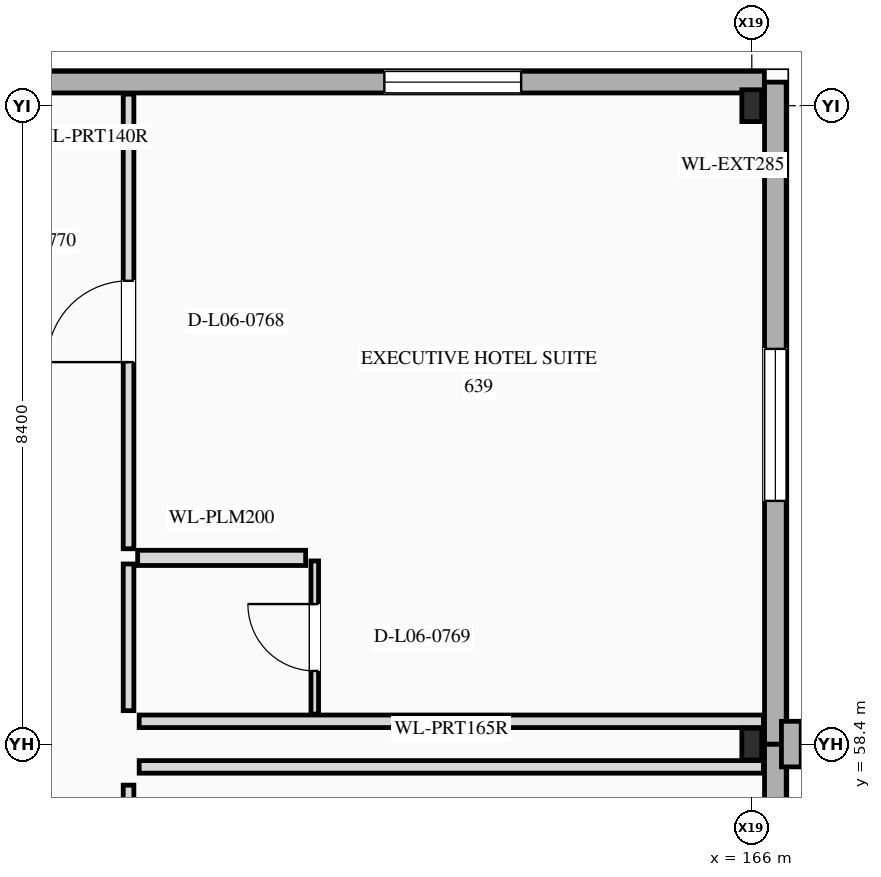
"""IFC4 building model, lengths in metres.
Left out: names, types, materials, properties, quantities, classifications, styles, units other than length and angle.
Written with IfcOpenShell. Run it as: python <this file> out.ifc"""

import sys

from ifc_helpers import new_model, si_unit, direction, frame, frame_2d, origin, origin_2d, place, context, subcontext, project, spatial, rectangle, i_section, extrude, element, fill, save


model = new_model("IFC4")
c1 = context("Model", 3, precision=1e-05, world=origin(), true_north=direction((0.0, 1.0)))
c2 = subcontext(c1, "Body", "Model", "MODEL_VIEW")
j1 = project(units=[si_unit("LENGTHUNIT", "METRE"), si_unit("PLANEANGLEUNIT", "RADIAN")], contexts=[c1])
p1 = place(None, origin())
s1 = spatial("IfcSite", under=j1, at=p1, CompositionType="ELEMENT")
p2 = place(p1, origin())
s2 = spatial("IfcBuilding", under=s1, at=p2, CompositionType="ELEMENT")
p3 = place(p2, frame((0.0, 0.0, 27.0)))
s3 = spatial("IfcBuildingStorey", under=s2, at=p3, CompositionType="ELEMENT", Elevation=27.0)
for number, where, z_axis, x_axis in (
    (1, (166.0, 58.4, 0.0), (0.0, 0.0, 1.0), (1.0, 0.0, 0.0)),
    (2, (166.0, 66.8, 0.0), (0.0, 0.0, 1.0), (1.0, 0.0, 0.0)),
):
    element("IfcColumn", number, at=place(p3, frame(where, z_axis=z_axis, x_axis=x_axis)), inside=s3, PredefinedType="COLUMN", context=c2, shape_type="SweptSolid", body=[
        extrude(i_section(OverallWidth=0.262, OverallDepth=0.419, WebThickness=0.012, FlangeThickness=0.019, at=origin_2d()), origin(), (0.0, 0.0, 1.0), 3.6),
    ])
p4 = place(p3, frame((166.31, 50.0, 0.0), z_axis=(0.0, 0.0, 1.0), x_axis=(0.0, 1.0, 0.0)))
e3 = element("IfcWall", 3, at=p4, inside=s3, PredefinedType="STANDARD", context=c2, shape_type="SweptSolid", body=[
    extrude(rectangle(XDim=8.4, YDim=0.285, at=frame_2d((4.2, 0.0))), origin(), (0.0, 0.0, 1.0), 3.6),
])
p5 = place(p4, frame((3.2, 0.0, 0.85)))
e4 = element("IfcOpeningElement", 4, at=p5, cuts=e3, PredefinedType="OPENING", context=c2, shape_type="SweptSolid", body=[
    extrude(rectangle(XDim=2.0, YDim=1.65, at=frame_2d((1.0, 0.825))), frame((0.0, 0.152, 0.0), z_axis=(0.0, -1.0, 0.0), x_axis=(1.0, 0.0, 0.0)), (0.0, 0.0, 1.0), 0.305),
])
p6 = place(p3, frame((166.31, 58.4, 0.0), z_axis=(0.0, 0.0, 1.0), x_axis=(0.0, 1.0, 0.0)))
e5 = element("IfcWall", 5, at=p6, inside=s3, PredefinedType="STANDARD", context=c2, shape_type="SweptSolid", body=[
    extrude(rectangle(XDim=8.71, YDim=0.285, at=frame_2d((4.355, 0.0))), origin(), (0.0, 0.0, 1.0), 3.6),
])
p7 = place(p6, frame((3.2, 0.0, 0.85)))
e6 = element("IfcOpeningElement", 6, at=p7, cuts=e5, PredefinedType="OPENING", context=c2, shape_type="SweptSolid", body=[
    extrude(rectangle(XDim=2.0, YDim=1.65, at=frame_2d((1.0, 0.825))), frame((0.0, 0.152, 0.0), z_axis=(0.0, -1.0, 0.0), x_axis=(1.0, 0.0, 0.0)), (0.0, 0.0, 1.0), 0.305),
])
p8 = place(p3, frame((166.52, 58.1, 0.0), z_axis=(0.0, 0.0, 1.0), x_axis=(0.0, 1.0, 0.0)))
e7 = element("IfcWall", 7, at=p8, inside=s3, PredefinedType="ELEMENTEDWALL", context=c2, shape_type="SweptSolid", body=[
    extrude(rectangle(XDim=0.6, YDim=0.26, at=frame_2d((0.3, 0.0))), origin(), (0.0, 0.0, 1.0), 3.6),
])
p9 = place(p3, frame((166.166, 67.11, 0.0), z_axis=(0.0, 0.0, 1.0), x_axis=(-1.0, 0.0, 0.0)))
e8 = element("IfcWall", 8, at=p9, inside=s3, PredefinedType="STANDARD", context=c2, shape_type="SweptSolid", body=[
    extrude(rectangle(XDim=19.131, YDim=0.285, at=frame_2d((9.565, 0.0))), origin(), (0.0, 0.0, 1.0), 3.6),
])
p10 = place(p9, frame((3.2, 0.0, 0.88)))
e9 = element("IfcOpeningElement", 9, at=p10, cuts=e8, PredefinedType="OPENING", context=c2, shape_type="SweptSolid", body=[
    extrude(rectangle(XDim=1.8, YDim=1.8, at=frame_2d((0.9, 0.9))), frame((0.0, 0.152, 0.0), z_axis=(0.0, -1.0, 0.0), x_axis=(1.0, 0.0, 0.0)), (0.0, 0.0, 1.0), 0.305),
])
p11 = place(p9, frame((13.5, 0.0, 0.88)))
e10 = element("IfcOpeningElement", 10, at=p11, cuts=e8, PredefinedType="OPENING", context=c2, shape_type="SweptSolid", body=[
    extrude(rectangle(XDim=1.8, YDim=1.8, at=frame_2d((0.9, 0.9))), frame((0.0, 0.152, 0.0), z_axis=(0.0, -1.0, 0.0), x_axis=(1.0, 0.0, 0.0)), (0.0, 0.0, 1.0), 0.305),
])
p12 = place(p3, frame((157.8, 52.57, 0.0), z_axis=(0.0, 0.0, 1.0), x_axis=(0.0, 1.0, 0.0)))
e11 = element("IfcWall", 11, at=p12, inside=s3, PredefinedType="PARTITIONING", context=c2, shape_type="SweptSolid", body=[
    extrude(rectangle(XDim=5.29, YDim=0.14, at=frame_2d((2.645, 0.0))), origin(), (0.0, 0.0, 1.0), 2.843),
])
p13 = place(p12, frame((2.14, 0.0, 0.0)))
e12 = element("IfcOpeningElement", 12, at=p13, cuts=e11, PredefinedType="OPENING", context=c2, shape_type="SweptSolid", body=[
    extrude(rectangle(XDim=1.01, YDim=2.35, at=frame_2d((0.505, 1.175))), frame((0.0, 0.08, 0.0), z_axis=(0.0, -1.0, 0.0), x_axis=(1.0, 0.0, 0.0)), (0.0, 0.0, 1.0), 0.16),
])
p14 = place(p3, frame((157.94, 58.1, 0.0), z_axis=(0.0, 0.0, 1.0), x_axis=(1.0, 0.0, 0.0)))
e13 = element("IfcWall", 13, at=p14, inside=s3, PredefinedType="PARTITIONING", context=c2, shape_type="SweptSolid", body=[
    extrude(rectangle(XDim=8.213, YDim=0.165, at=frame_2d((4.106, 0.0))), origin(), (0.0, 0.0, 1.0), 2.68),
])
p15 = place(p3, frame((157.8, 58.84, 0.0), z_axis=(0.0, 0.0, 1.0), x_axis=(0.0, 1.0, 0.0)))
e14 = element("IfcWall", 14, at=p15, inside=s3, PredefinedType="PARTITIONING", context=c2, shape_type="SweptSolid", body=[
    extrude(rectangle(XDim=1.93, YDim=0.14, at=frame_2d((0.965, 0.0))), origin(), (0.0, 0.0, 1.0), 2.848),
])
p16 = place(p3, frame((157.8, 60.97, 0.0), z_axis=(0.0, 0.0, 1.0), x_axis=(0.0, 1.0, 0.0)))
e15 = element("IfcWall", 15, at=p16, inside=s3, PredefinedType="PARTITIONING", context=c2, shape_type="SweptSolid", body=[
    extrude(rectangle(XDim=5.982, YDim=0.14, at=frame_2d((2.991, 0.0))), origin(), (0.0, 0.0, 1.0), 2.703),
])
p17 = place(p16, frame((2.456, 0.0, 0.0)))
e16 = element("IfcOpeningElement", 16, at=p17, cuts=e15, PredefinedType="OPENING", context=c2, shape_type="SweptSolid", body=[
    extrude(rectangle(XDim=1.07, YDim=2.4, at=frame_2d((0.535, 1.2))), frame((0.0, 0.08, 0.0), z_axis=(0.0, -1.0, 0.0), x_axis=(1.0, 0.0, 0.0)), (0.0, 0.0, 1.0), 0.16),
])
p18 = place(p3, frame((157.94, 58.7, 0.0), z_axis=(0.0, 0.0, 1.0), x_axis=(1.0, 0.0, 0.0)))
e17 = element("IfcWall", 17, at=p18, inside=s3, PredefinedType="PARTITIONING", context=c2, shape_type="SweptSolid", body=[
    extrude(rectangle(XDim=8.213, YDim=0.165, at=frame_2d((4.106, 0.0))), origin(), (0.0, 0.0, 1.0), 2.68),
])
p19 = place(p3, frame((157.92, 60.85, 0.0), z_axis=(0.0, 0.0, 1.0), x_axis=(1.0, 0.0, 0.0)))
e18 = element("IfcWall", 18, at=p19, inside=s3, PredefinedType="PLUMBINGWALL", context=c2, shape_type="SweptSolid", body=[
    extrude(rectangle(XDim=2.21, YDim=0.2, at=frame_2d((1.105, 0.0))), origin(), (0.0, 0.0, 1.0), 3.29),
])
p20 = place(p3, frame((160.25, 58.794, 0.0), z_axis=(0.0, 0.0, 1.0), x_axis=(0.0, 1.0, 0.0)))
e19 = element("IfcWall", 19, at=p20, inside=s3, PredefinedType="PARTITIONING", context=c2, shape_type="SweptSolid", body=[
    extrude(rectangle(XDim=2.016, YDim=0.1, at=frame_2d((1.008, 0.0))), origin(), (0.0, 0.0, 1.0), 2.848),
])
p21 = place(p20, frame((0.568, 0.0, 0.0)))
e20 = element("IfcOpeningElement", 20, at=p21, cuts=e19, PredefinedType="OPENING", context=c2, shape_type="SweptSolid", body=[
    extrude(rectangle(XDim=0.88, YDim=2.18, at=frame_2d((0.44, 1.09))), frame((0.0, 0.06, 0.0), z_axis=(0.0, -1.0, 0.0), x_axis=(1.0, 0.0, 0.0)), (0.0, 0.0, 1.0), 0.12),
])
p22 = place(p7, origin())
e21 = element("IfcWindow", 21, at=p22, inside=s3, PartitioningType="SINGLE_PANEL", PredefinedType="WINDOW", context=c2, shape_type="SweptSolid", body=[
    extrude(rectangle(XDim=2.0, YDim=1.65, at=frame_2d((1.0, 0.825))), frame((0.0, 0.03, 0.0), z_axis=(0.0, -1.0, 0.0), x_axis=(1.0, 0.0, 0.0)), (0.0, 0.0, 1.0), 0.06),
])
fill(e6, e21)
p23 = place(p10, origin())
e22 = element("IfcWindow", 22, at=p23, inside=s3, PartitioningType="SINGLE_PANEL", PredefinedType="WINDOW", context=c2, shape_type="SweptSolid", body=[
    extrude(rectangle(XDim=1.8, YDim=1.8, at=frame_2d((0.9, 0.9))), frame((0.0, 0.03, 0.0), z_axis=(0.0, -1.0, 0.0), x_axis=(1.0, 0.0, 0.0)), (0.0, 0.0, 1.0), 0.06),
])
fill(e9, e22)
p24 = place(p17, origin())
e23 = element("IfcDoor", 23, at=p24, inside=s3, OperationType="SINGLE_SWING_LEFT", PredefinedType="DOOR", context=c2, shape_type="SweptSolid", body=[
    extrude(rectangle(XDim=1.07, YDim=2.4, at=frame_2d((0.535, 1.2))), frame((0.0, 0.025, 0.0), z_axis=(0.0, -1.0, 0.0), x_axis=(1.0, 0.0, 0.0)), (0.0, 0.0, 1.0), 0.05),
])
fill(e16, e23)
p25 = place(p21, origin())
e24 = element("IfcDoor", 24, at=p25, inside=s3, OperationType="SINGLE_SWING_RIGHT", PredefinedType="DOOR", context=c2, shape_type="SweptSolid", body=[
    extrude(rectangle(XDim=0.88, YDim=2.18, at=frame_2d((0.44, 1.09))), frame((0.0, 0.025, 0.0), z_axis=(0.0, -1.0, 0.0), x_axis=(1.0, 0.0, 0.0)), (0.0, 0.0, 1.0), 0.05),
])
fill(e20, e24)
save(model, sys.argv[1])
